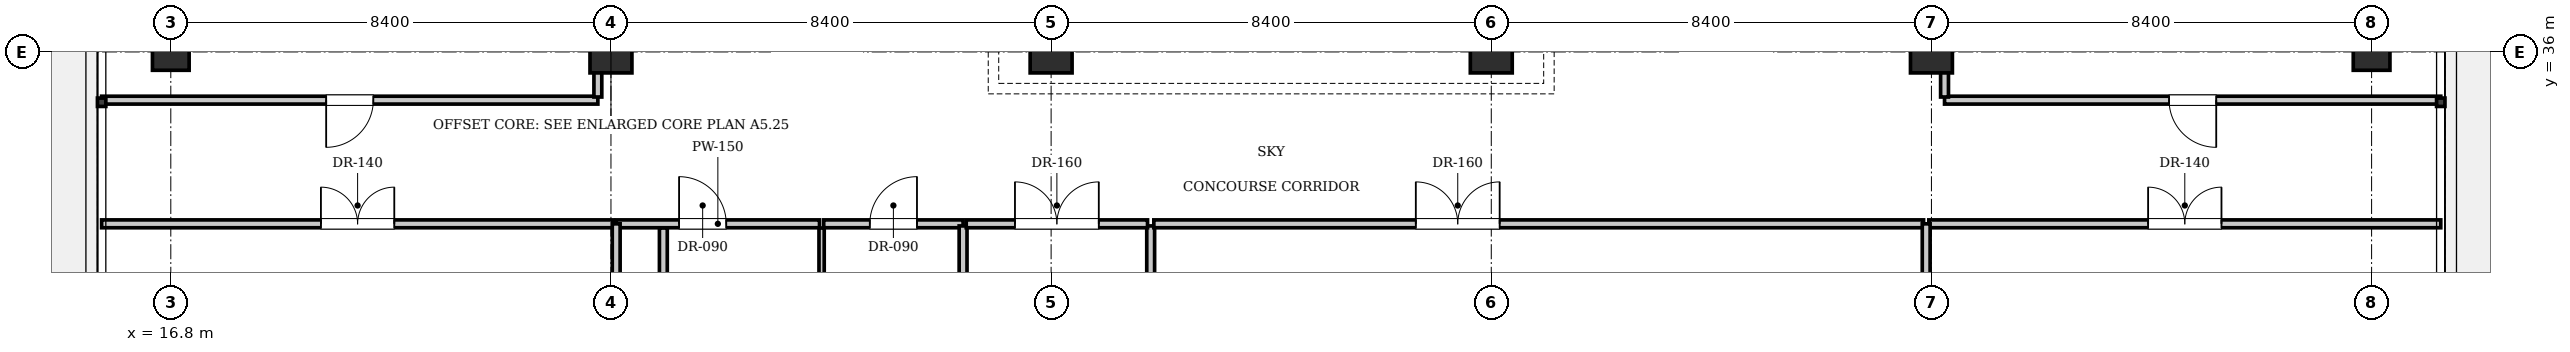
"""IFC4 building model, lengths in metres.
Left out: names, types, materials, properties, quantities, classifications, styles, units other than length and angle.
Written with IfcOpenShell. Run it as: python <this file> out.ifc"""

import sys

from ifc_helpers import new_model, si_unit, direction, frame, frame_2d, origin, origin_2d, place, context, subcontext, project, spatial, rectangle, extrude, element, fill, save


model = new_model("IFC4")
c1 = context("Model", 3, precision=1e-05, world=origin(), true_north=direction((0.0, 1.0)))
c2 = subcontext(c1, "Body", "Model", "MODEL_VIEW")
j1 = project(units=[si_unit("LENGTHUNIT", "METRE"), si_unit("PLANEANGLEUNIT", "RADIAN")], contexts=[c1])
p1 = place(None, origin())
s1 = spatial("IfcSite", under=j1, at=p1, CompositionType="ELEMENT")
p2 = place(p1, origin())
s2 = spatial("IfcBuilding", under=s1, at=p2, CompositionType="ELEMENT")
p3 = place(p2, frame((0.0, 0.0, 234.5)))
s3 = spatial("IfcBuildingStorey", under=s2, at=p3, CompositionType="ELEMENT", Elevation=234.5)
for number, where, z_axis, x_axis in (
    (1, (25.2, 36.0, 0.0), (0.0, 0.0, 1.0), (1.0, 0.0, 0.0)),
    (2, (33.6, 36.0, 0.0), (0.0, 0.0, 1.0), (1.0, 0.0, 0.0)),
    (3, (42.0, 36.0, 0.0), (0.0, 0.0, 1.0), (1.0, 0.0, 0.0)),
    (4, (50.4, 36.0, 0.0), (0.0, 0.0, 1.0), (1.0, 0.0, 0.0)),
):
    element("IfcColumn", number, at=place(p3, frame(where, z_axis=z_axis, x_axis=x_axis)), inside=s3, PredefinedType="COLUMN", context=c2, shape_type="SweptSolid", body=[
        extrude(rectangle(XDim=0.8, YDim=0.8, at=origin_2d()), origin(), (0.0, 0.0, 1.0), 4.9),
    ])
for number, where, z_axis, x_axis in (
    (5, (16.8, 36.0, 0.0), (0.0, 0.0, 1.0), (1.0, 0.0, 0.0)),
    (6, (58.8, 36.0, 0.0), (0.0, 0.0, 1.0), (1.0, 0.0, 0.0)),
):
    element("IfcColumn", number, at=place(p3, frame(where, z_axis=z_axis, x_axis=x_axis)), inside=s3, PredefinedType="COLUMN", context=c2, shape_type="SweptSolid", body=[
        extrude(rectangle(XDim=0.7, YDim=0.7, at=origin_2d()), origin(), (0.0, 0.0, 1.0), 4.9),
    ])
p4 = place(p3, frame((25.3, 32.72, 0.0), z_axis=(0.0, 0.0, 1.0), x_axis=(1.0, 0.0, 0.0)))
e7 = element("IfcWall", 7, at=p4, inside=s3, PredefinedType="PARTITIONING", context=c2, shape_type="SweptSolid", body=[
    extrude(rectangle(XDim=3.88, YDim=0.15, at=frame_2d((1.94, 0.0))), origin(), (0.0, 0.0, 1.0), 4.66),
])
p5 = place(p4, frame((1.2, 0.0, 0.0)))
e8 = element("IfcOpeningElement", 8, at=p5, cuts=e7, PredefinedType="OPENING", context=c2, shape_type="SweptSolid", body=[
    extrude(rectangle(XDim=0.9, YDim=2.1, at=frame_2d((0.45, 1.05))), frame((0.0, 0.085, 0.0), z_axis=(0.0, -1.0, 0.0), x_axis=(1.0, 0.0, 0.0)), (0.0, 0.0, 1.0), 0.17),
])
p6 = place(p3, frame((29.26, 32.72, 0.0), z_axis=(0.0, 0.0, 1.0), x_axis=(1.0, 0.0, 0.0)))
e9 = element("IfcWall", 9, at=p6, inside=s3, PredefinedType="PARTITIONING", context=c2, shape_type="SweptSolid", body=[
    extrude(rectangle(XDim=2.66, YDim=0.15, at=frame_2d((1.33, 0.0))), origin(), (0.0, 0.0, 1.0), 4.66),
])
p7 = place(p6, frame((0.88, 0.0, 0.0)))
e10 = element("IfcOpeningElement", 10, at=p7, cuts=e9, PredefinedType="OPENING", context=c2, shape_type="SweptSolid", body=[
    extrude(rectangle(XDim=0.9, YDim=2.1, at=frame_2d((0.45, 1.05))), frame((0.0, 0.085, 0.0), z_axis=(0.0, -1.0, 0.0), x_axis=(1.0, 0.0, 0.0)), (0.0, 0.0, 1.0), 0.17),
])
p8 = place(p3, frame((26.2, 29.46, 0.0), z_axis=(0.0, 0.0, 1.0), x_axis=(0.0, 1.0, 0.0)))
e11 = element("IfcWall", 11, at=p8, inside=s3, PredefinedType="PARTITIONING", context=c2, shape_type="SweptSolid", body=[
    extrude(rectangle(XDim=3.18, YDim=0.15, at=frame_2d((1.59, 0.0))), origin(), (0.0, 0.0, 1.0), 4.66),
])
p9 = place(p3, frame((29.22, 29.46, 0.0), z_axis=(0.0, 0.0, 1.0), x_axis=(0.0, 1.0, 0.0)))
e12 = element("IfcWall", 12, at=p9, inside=s3, PredefinedType="PARTITIONING", context=c2, shape_type="SweptSolid", body=[
    extrude(rectangle(XDim=3.18, YDim=0.1, at=frame_2d((1.59, 0.0))), origin(), (0.0, 0.0, 1.0), 4.66),
])
p10 = place(p3, frame((31.92, 29.46, 0.0), z_axis=(0.0, 0.0, 1.0), x_axis=(0.0, 1.0, 0.0)))
e13 = element("IfcWall", 13, at=p10, inside=s3, PredefinedType="PARTITIONING", context=c2, shape_type="SweptSolid", body=[
    extrude(rectangle(XDim=3.22, YDim=0.15, at=frame_2d((1.61, 0.0))), origin(), (0.0, 0.0, 1.0), 4.66),
])
p11 = place(p3, frame((35.5, 23.58, 0.0), z_axis=(0.0, 0.0, 1.0), x_axis=(0.0, 1.0, 0.0)))
e14 = element("IfcWall", 14, at=p11, inside=s3, PredefinedType="PARTITIONING", context=c2, shape_type="SweptSolid", body=[
    extrude(rectangle(XDim=9.1, YDim=0.15, at=frame_2d((4.55, 0.0))), origin(), (0.0, 0.0, 1.0), 4.66),
])
p12 = place(p3, frame((31.98, 32.72, 0.0), z_axis=(0.0, 0.0, 1.0), x_axis=(1.0, 0.0, 0.0)))
e15 = element("IfcWall", 15, at=p12, inside=s3, PredefinedType="PARTITIONING", context=c2, shape_type="SweptSolid", body=[
    extrude(rectangle(XDim=3.46, YDim=0.15, at=frame_2d((1.73, 0.0))), origin(), (0.0, 0.0, 1.0), 4.66),
])
p13 = place(p12, frame((0.93, 0.0, 0.0)))
e16 = element("IfcOpeningElement", 16, at=p13, cuts=e15, PredefinedType="OPENING", context=c2, shape_type="SweptSolid", body=[
    extrude(rectangle(XDim=1.6, YDim=2.3, at=frame_2d((0.8, 1.15))), frame((0.0, 0.085, 0.0), z_axis=(0.0, -1.0, 0.0), x_axis=(1.0, 0.0, 0.0)), (0.0, 0.0, 1.0), 0.17),
])
p14 = place(p3, frame((35.56, 32.72, 0.0), z_axis=(0.0, 0.0, 1.0), x_axis=(1.0, 0.0, 0.0)))
e17 = element("IfcWall", 17, at=p14, inside=s3, PredefinedType="PARTITIONING", context=c2, shape_type="SweptSolid", body=[
    extrude(rectangle(XDim=14.69, YDim=0.15, at=frame_2d((7.345, 0.0))), origin(), (0.0, 0.0, 1.0), 4.66),
])
p15 = place(p14, frame((5.0, 0.0, 0.0)))
e18 = element("IfcOpeningElement", 18, at=p15, cuts=e17, PredefinedType="OPENING", context=c2, shape_type="SweptSolid", body=[
    extrude(rectangle(XDim=1.6, YDim=2.3, at=frame_2d((0.8, 1.15))), frame((0.0, 0.085, 0.0), z_axis=(0.0, -1.0, 0.0), x_axis=(1.0, 0.0, 0.0)), (0.0, 0.0, 1.0), 0.17),
])
p16 = place(p3, frame((15.48, 32.72, 0.0), z_axis=(0.0, 0.0, 1.0), x_axis=(1.0, 0.0, 0.0)))
e19 = element("IfcWall", 19, at=p16, inside=s3, PredefinedType="PARTITIONING", context=c2, shape_type="SweptSolid", body=[
    extrude(rectangle(XDim=9.77, YDim=0.15, at=frame_2d((4.885, 0.0))), origin(), (0.0, 0.0, 1.0), 4.66),
])
p17 = place(p16, frame((4.185, 0.0, 0.0)))
e20 = element("IfcOpeningElement", 20, at=p17, cuts=e19, PredefinedType="OPENING", context=c2, shape_type="SweptSolid", body=[
    extrude(rectangle(XDim=1.4, YDim=2.2, at=frame_2d((0.7, 1.1))), frame((0.0, 0.085, 0.0), z_axis=(0.0, -1.0, 0.0), x_axis=(1.0, 0.0, 0.0)), (0.0, 0.0, 1.0), 0.17),
])
p18 = place(p3, frame((50.35, 32.72, 0.0), z_axis=(0.0, 0.0, 1.0), x_axis=(1.0, 0.0, 0.0)))
e21 = element("IfcWall", 21, at=p18, inside=s3, PredefinedType="PARTITIONING", context=c2, shape_type="SweptSolid", body=[
    extrude(rectangle(XDim=9.77, YDim=0.15, at=frame_2d((4.885, 0.0))), origin(), (0.0, 0.0, 1.0), 4.66),
])
p19 = place(p18, frame((4.185, 0.0, 0.0)))
e22 = element("IfcOpeningElement", 22, at=p19, cuts=e21, PredefinedType="OPENING", context=c2, shape_type="SweptSolid", body=[
    extrude(rectangle(XDim=1.4, YDim=2.2, at=frame_2d((0.7, 1.1))), frame((0.0, 0.085, 0.0), z_axis=(0.0, -1.0, 0.0), x_axis=(1.0, 0.0, 0.0)), (0.0, 0.0, 1.0), 0.17),
])
for number, where, z_axis, x_axis in (
    (23, (25.3, 9.28, 0.0), (0.0, 0.0, 1.0), (0.0, 1.0, 0.0)),
    (24, (50.3, 9.28, 0.0), (0.0, 0.0, 1.0), (0.0, 1.0, 0.0)),
):
    element("IfcWall", number, at=place(p3, frame(where, z_axis=z_axis, x_axis=x_axis)), inside=s3, PredefinedType="PARTITIONING", context=c2, shape_type="SweptSolid", body=[
        extrude(rectangle(XDim=23.44, YDim=0.15, at=frame_2d((11.72, 0.0))), origin(), (0.0, 0.0, 1.0), 4.127),
    ])
p20 = place(p3, frame((15.48, 35.08, 0.0), z_axis=(0.0, 0.0, 1.0), x_axis=(1.0, 0.0, 0.0)))
e25 = element("IfcWall", 25, at=p20, inside=s3, PredefinedType="PARTITIONING", context=c2, shape_type="SweptSolid", body=[
    extrude(rectangle(XDim=9.47, YDim=0.15, at=frame_2d((4.735, 0.0))), origin(), (0.0, 0.0, 1.0), 4.66),
])
p21 = place(p20, frame((4.285, 0.0, 0.0)))
e26 = element("IfcOpeningElement", 26, at=p21, cuts=e25, PredefinedType="OPENING", context=c2, shape_type="SweptSolid", body=[
    extrude(rectangle(XDim=0.9, YDim=2.1, at=frame_2d((0.45, 1.05))), frame((0.0, 0.085, 0.0), z_axis=(0.0, -1.0, 0.0), x_axis=(1.0, 0.0, 0.0)), (0.0, 0.0, 1.0), 0.17),
])
p22 = place(p3, frame((24.95, 35.14, 0.0), z_axis=(0.0, 0.0, 1.0), x_axis=(0.0, 1.0, 0.0)))
e27 = element("IfcWall", 27, at=p22, inside=s3, PredefinedType="PARTITIONING", context=c2, shape_type="SweptSolid", body=[
    extrude(rectangle(XDim=18.78, YDim=0.15, at=frame_2d((9.39, 0.0))), origin(), (0.0, 0.0, 1.0), 4.66),
])
p23 = place(p3, frame((50.65, 35.08, 0.0), z_axis=(0.0, 0.0, 1.0), x_axis=(1.0, 0.0, 0.0)))
e28 = element("IfcWall", 28, at=p23, inside=s3, PredefinedType="PARTITIONING", context=c2, shape_type="SweptSolid", body=[
    extrude(rectangle(XDim=9.47, YDim=0.15, at=frame_2d((4.735, 0.0))), origin(), (0.0, 0.0, 1.0), 4.66),
])
p24 = place(p23, frame((4.285, 0.0, 0.0)))
e29 = element("IfcOpeningElement", 29, at=p24, cuts=e28, PredefinedType="OPENING", context=c2, shape_type="SweptSolid", body=[
    extrude(rectangle(XDim=0.9, YDim=2.1, at=frame_2d((0.45, 1.05))), frame((0.0, 0.085, 0.0), z_axis=(0.0, -1.0, 0.0), x_axis=(1.0, 0.0, 0.0)), (0.0, 0.0, 1.0), 0.17),
])
p25 = place(p3, frame((50.65, 35.14, 0.0), z_axis=(0.0, 0.0, 1.0), x_axis=(0.0, 1.0, 0.0)))
e30 = element("IfcWall", 30, at=p25, inside=s3, PredefinedType="PARTITIONING", context=c2, shape_type="SweptSolid", body=[
    extrude(rectangle(XDim=18.78, YDim=0.15, at=frame_2d((9.39, 0.0))), origin(), (0.0, 0.0, 1.0), 4.66),
])
p26 = place(p5, origin())
e31 = element("IfcDoor", 31, at=p26, inside=s3, OperationType="SINGLE_SWING_LEFT", PredefinedType="DOOR", context=c2, shape_type="SweptSolid", body=[
    extrude(rectangle(XDim=0.9, YDim=2.1, at=frame_2d((0.45, 1.05))), frame((0.0, 0.025, 0.0), z_axis=(0.0, -1.0, 0.0), x_axis=(1.0, 0.0, 0.0)), (0.0, 0.0, 1.0), 0.05),
])
fill(e8, e31)
p27 = place(p7, origin())
e32 = element("IfcDoor", 32, at=p27, inside=s3, OperationType="SINGLE_SWING_RIGHT", PredefinedType="DOOR", context=c2, shape_type="SweptSolid", body=[
    extrude(rectangle(XDim=0.9, YDim=2.1, at=frame_2d((0.45, 1.05))), frame((0.0, 0.025, 0.0), z_axis=(0.0, -1.0, 0.0), x_axis=(1.0, 0.0, 0.0)), (0.0, 0.0, 1.0), 0.05),
])
fill(e10, e32)
p28 = place(p13, origin())
e33 = element("IfcDoor", 33, at=p28, inside=s3, OperationType="DOUBLE_DOOR_SINGLE_SWING", PredefinedType="DOOR", context=c2, shape_type="SweptSolid", body=[
    extrude(rectangle(XDim=1.6, YDim=2.3, at=frame_2d((0.8, 1.15))), frame((0.0, 0.025, 0.0), z_axis=(0.0, -1.0, 0.0), x_axis=(1.0, 0.0, 0.0)), (0.0, 0.0, 1.0), 0.05),
])
fill(e16, e33)
p29 = place(p15, origin())
e34 = element("IfcDoor", 34, at=p29, inside=s3, OperationType="DOUBLE_DOOR_SINGLE_SWING", PredefinedType="DOOR", context=c2, shape_type="SweptSolid", body=[
    extrude(rectangle(XDim=1.6, YDim=2.3, at=frame_2d((0.8, 1.15))), frame((0.0, 0.025, 0.0), z_axis=(0.0, -1.0, 0.0), x_axis=(1.0, 0.0, 0.0)), (0.0, 0.0, 1.0), 0.05),
])
fill(e18, e34)
p30 = place(p17, origin())
e35 = element("IfcDoor", 35, at=p30, inside=s3, OperationType="DOUBLE_DOOR_SINGLE_SWING", PredefinedType="DOOR", context=c2, shape_type="SweptSolid", body=[
    extrude(rectangle(XDim=1.4, YDim=2.2, at=frame_2d((0.7, 1.1))), frame((0.0, 0.025, 0.0), z_axis=(0.0, -1.0, 0.0), x_axis=(1.0, 0.0, 0.0)), (0.0, 0.0, 1.0), 0.05),
])
fill(e20, e35)
p31 = place(p19, origin())
e36 = element("IfcDoor", 36, at=p31, inside=s3, OperationType="DOUBLE_DOOR_SINGLE_SWING", PredefinedType="DOOR", context=c2, shape_type="SweptSolid", body=[
    extrude(rectangle(XDim=1.4, YDim=2.2, at=frame_2d((0.7, 1.1))), frame((0.0, 0.025, 0.0), z_axis=(0.0, -1.0, 0.0), x_axis=(1.0, 0.0, 0.0)), (0.0, 0.0, 1.0), 0.05),
])
fill(e22, e36)
p32 = place(p21, frame((0.9, 0.0, 0.0), z_axis=(0.0, 0.0, 1.0), x_axis=(-1.0, 0.0, 0.0)))
e37 = element("IfcDoor", 37, at=p32, inside=s3, OperationType="SINGLE_SWING_RIGHT", PredefinedType="DOOR", context=c2, shape_type="SweptSolid", body=[
    extrude(rectangle(XDim=0.9, YDim=2.1, at=frame_2d((0.45, 1.05))), frame((0.0, 0.025, 0.0), z_axis=(0.0, -1.0, 0.0), x_axis=(1.0, 0.0, 0.0)), (0.0, 0.0, 1.0), 0.05),
])
fill(e26, e37)
p33 = place(p24, frame((0.9, 0.0, 0.0), z_axis=(0.0, 0.0, 1.0), x_axis=(-1.0, 0.0, 0.0)))
e38 = element("IfcDoor", 38, at=p33, inside=s3, OperationType="SINGLE_SWING_LEFT", PredefinedType="DOOR", context=c2, shape_type="SweptSolid", body=[
    extrude(rectangle(XDim=0.9, YDim=2.1, at=frame_2d((0.45, 1.05))), frame((0.0, 0.025, 0.0), z_axis=(0.0, -1.0, 0.0), x_axis=(1.0, 0.0, 0.0)), (0.0, 0.0, 1.0), 0.05),
])
fill(e29, e38)
save(model, sys.argv[1])
